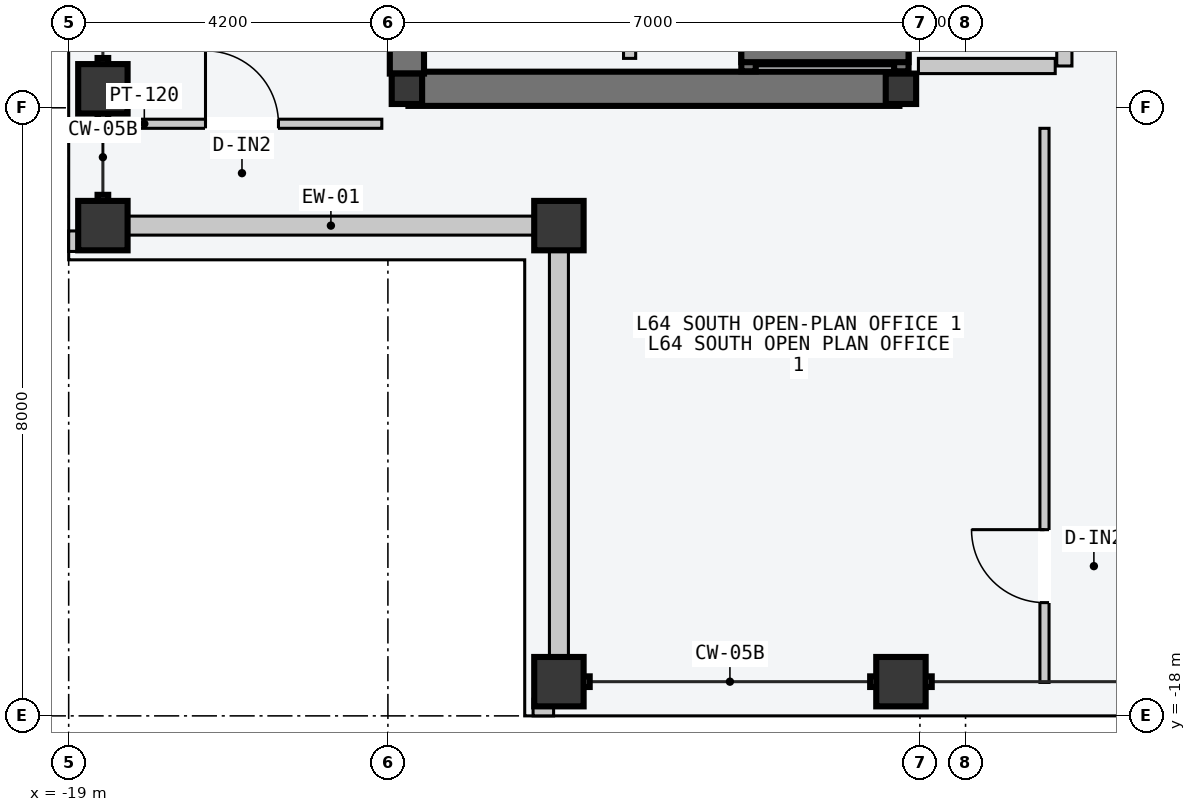
"""IFC4 building model, lengths in metres.
Left out: names, types, materials, properties, quantities, classifications, styles, units other than length and angle.
Written with IfcOpenShell. Run it as: python <this file> out.ifc"""

import sys

from ifc_helpers import new_model, si_unit, direction, frame, frame_2d, origin, origin_2d, place, context, subcontext, project, spatial, rectangle, hollow_rectangle, i_section, extrude, element, fill, save


model = new_model("IFC4")
c1 = context("Model", 3, precision=1e-05, world=origin(), true_north=direction((0.0, 1.0)))
c2 = subcontext(c1, "Body", "Model", "MODEL_VIEW")
j1 = project(units=[si_unit("LENGTHUNIT", "METRE"), si_unit("PLANEANGLEUNIT", "RADIAN")], contexts=[c1])
p1 = place(None, origin())
s1 = spatial("IfcSite", under=j1, at=p1, CompositionType="ELEMENT")
p2 = place(p1, origin())
s2 = spatial("IfcBuilding", under=s1, at=p2, CompositionType="ELEMENT")
p3 = place(p2, frame((0.0, 0.0, 243.6)))
s3 = spatial("IfcBuildingStorey", under=s2, at=p3, CompositionType="ELEMENT", Elevation=243.6)
p4 = place(p3, frame((-14.53, -9.75, -0.2), z_axis=(0.0, 0.0, 1.0), x_axis=(1.0, 0.0, 0.0)))
e1 = element("IfcWall", 1, at=p4, inside=s3, PredefinedType="SHEAR", context=c2, shape_type="SweptSolid", body=[
    extrude(rectangle(XDim=6.46, YDim=0.45, at=frame_2d((3.23, 0.0))), origin(), (0.0, 0.0, 1.0), 3.6),
])
p5 = place(p3, frame((-14.55, -9.55, -0.2), z_axis=(0.0, 0.0, 1.0), x_axis=(0.0, 1.0, 0.0)))
e2 = element("IfcWall", 2, at=p5, inside=s3, PredefinedType="SHEAR", context=c2, shape_type="SweptSolid", body=[
    extrude(rectangle(XDim=9.35, YDim=0.45, at=frame_2d((4.675, 0.0))), origin(), (0.0, 0.0, 1.0), 3.6),
])
for number, where, z_axis, x_axis in (
    (3, (-14.55, -9.75, 0.0), (0.0, 0.0, 1.0), (1.0, 0.0, 0.0)),
    (4, (-8.05, -9.75, 0.0), (0.0, 0.0, 1.0), (1.0, 0.0, 0.0)),
):
    element("IfcColumn", number, at=place(p3, frame(where, z_axis=z_axis, x_axis=x_axis)), inside=s3, PredefinedType="COLUMN", context=c2, shape_type="SweptSolid", body=[
        extrude(i_section(OverallWidth=0.4, OverallDepth=0.4, WebThickness=0.013, FlangeThickness=0.021, at=origin_2d()), origin(), (0.0, 0.0, 1.0), 3.6),
    ])
for number, where, z_axis, x_axis in (
    (5, (-12.55, -17.55, 0.0), (0.0, 0.0, 1.0), (1.0, 0.0, 0.0)),
    (6, (-8.05, -17.55, 0.0), (0.0, 0.0, 1.0), (1.0, 0.0, 0.0)),
    (7, (-18.55, -11.55, 0.0), (0.0, 0.0, 1.0), (0.0, 1.0, 0.0)),
    (8, (-18.55, -9.75, 0.0), (0.0, 0.0, 1.0), (0.0, 1.0, 0.0)),
    (9, (-12.55, -11.55, 0.0), (0.0, 0.0, 1.0), (1.0, 0.0, 0.0)),
):
    element("IfcColumn", number, at=place(p3, frame(where, z_axis=z_axis, x_axis=x_axis)), inside=s3, PredefinedType="COLUMN", context=c2, shape_type="SweptSolid", body=[
        extrude(hollow_rectangle(XDim=0.65, YDim=0.65, WallThickness=0.028, at=origin_2d()), origin(), (0.0, 0.0, 1.0), 3.6),
    ])
for number, where, z_axis, x_axis in (
    (10, (-18.215, -11.55, 0.0), (0.0, 0.0, 1.0), (1.0, 0.0, 0.0)),
    (11, (-12.55, -17.215, 0.0), (0.0, 0.0, 1.0), (0.0, 1.0, 0.0)),
):
    element("IfcWall", number, at=place(p3, frame(where, z_axis=z_axis, x_axis=x_axis)), inside=s3, PredefinedType="STANDARD", context=c2, shape_type="SweptSolid", body=[
        extrude(rectangle(XDim=5.33, YDim=0.25, at=frame_2d((2.665, 0.0))), origin(), (0.0, 0.0, 1.0), 1.74),
    ])
for number, where, z_axis, x_axis in (
    (12, (-12.89, -17.89, 0.0), (0.0, 0.0, 1.0), (1.0, 0.0, 0.0)),
    (13, (-18.89, -11.89, 0.0), (0.0, 0.0, 1.0), (0.0, 1.0, 0.0)),
):
    element("IfcWall", number, at=place(p3, frame(where, z_axis=z_axis, x_axis=x_axis)), inside=s3, PredefinedType="PARAPET", context=c2, shape_type="SweptSolid", body=[
        extrude(rectangle(XDim=0.27, YDim=0.22, at=frame_2d((0.135, 0.0))), origin(), (0.0, 0.0, 1.0), 1.2),
    ])
p6 = place(p3, frame((-8.045, -9.52, -0.2), z_axis=(0.0, 0.0, 1.0), x_axis=(0.0, 1.0, 0.0)))
e14 = element("IfcWall", 14, at=p6, inside=s3, PredefinedType="SOLIDWALL", context=c2, shape_type="SweptSolid", body=[
    extrude(rectangle(XDim=2.12, YDim=0.19, at=frame_2d((1.06, 0.0))), origin(), (0.0, 0.0, 1.0), 3.6),
])
p7 = place(p6, frame((0.57, 0.0, 0.2)))
e15 = element("IfcOpeningElement", 15, at=p7, cuts=e14, PredefinedType="OPENING", context=c2, shape_type="SweptSolid", body=[
    extrude(rectangle(XDim=1.1, YDim=2.2, at=frame_2d((0.55, 1.1))), frame((0.0, 0.105, 0.0), z_axis=(0.0, -1.0, 0.0), x_axis=(1.0, 0.0, 0.0)), (0.0, 0.0, 1.0), 0.21),
])
p8 = place(p3, frame((-10.055, -9.52, -0.2), z_axis=(0.0, 0.0, 1.0), x_axis=(0.0, 1.0, 0.0)))
e16 = element("IfcWall", 16, at=p8, inside=s3, PredefinedType="SOLIDWALL", context=c2, shape_type="SweptSolid", body=[
    extrude(rectangle(XDim=2.12, YDim=0.19, at=frame_2d((1.06, 0.0))), origin(), (0.0, 0.0, 1.0), 3.6),
])
p9 = place(p3, frame((-10.15, -9.305, -0.2), z_axis=(0.0, 0.0, 1.0), x_axis=(1.0, 0.0, 0.0)))
e17 = element("IfcWall", 17, at=p9, inside=s3, PredefinedType="SOLIDWALL", context=c2, shape_type="SweptSolid", body=[
    extrude(rectangle(XDim=2.2, YDim=0.19, at=frame_2d((1.1, 0.0))), origin(), (0.0, 0.0, 1.0), 3.6),
])
p10 = place(p3, frame((-5.9, -9.45, 0.0), z_axis=(0.0, 0.0, 1.0), x_axis=(0.0, 1.0, 0.0)))
e18 = element("IfcWall", 18, at=p10, inside=s3, PredefinedType="PARTITIONING", context=c2, shape_type="SweptSolid", body=[
    extrude(rectangle(XDim=10.5, YDim=0.2, at=frame_2d((5.25, 0.0))), origin(), (0.0, 0.0, 1.0), 3.4),
])
p11 = place(p10, frame((3.9, 0.0, 0.0)))
e19 = element("IfcOpeningElement", 19, at=p11, cuts=e18, PredefinedType="OPENING", context=c2, shape_type="SweptSolid", body=[
    extrude(rectangle(XDim=1.5, YDim=2.2, at=frame_2d((0.75, 1.1))), frame((0.0, 0.11, 0.0), z_axis=(0.0, -1.0, 0.0), x_axis=(1.0, 0.0, 0.0)), (0.0, 0.0, 1.0), 0.22),
])
p12 = place(p3, frame((-6.02, -9.45, 0.0), z_axis=(0.0, 0.0, 1.0), x_axis=(-1.0, 0.0, 0.0)))
e20 = element("IfcWall", 20, at=p12, inside=s3, PredefinedType="PARTITIONING", context=c2, shape_type="SweptSolid", body=[
    extrude(rectangle(XDim=1.8, YDim=0.2, at=frame_2d((0.9, 0.0))), origin(), (0.0, 0.0, 1.0), 3.4),
])
p13 = place(p3, frame((-11.62, -9.35, 0.0), z_axis=(0.0, 0.0, 1.0), x_axis=(0.0, 1.0, 0.0)))
e21 = element("IfcWall", 21, at=p13, inside=s3, PredefinedType="PARTITIONING", context=c2, shape_type="SweptSolid", body=[
    extrude(rectangle(XDim=3.85, YDim=0.16, at=frame_2d((1.925, 0.0))), origin(), (0.0, 0.0, 1.0), 3.4),
])
p14 = place(p13, frame((1.475, 0.0, 0.0)))
e22 = element("IfcOpeningElement", 22, at=p14, cuts=e21, PredefinedType="OPENING", context=c2, shape_type="SweptSolid", body=[
    extrude(rectangle(XDim=0.9, YDim=2.15, at=frame_2d((0.45, 1.075))), frame((0.0, 0.09, 0.0), z_axis=(0.0, -1.0, 0.0), x_axis=(1.0, 0.0, 0.0)), (0.0, 0.0, 1.0), 0.18),
])
p15 = place(p3, frame((-6.161, -17.56, 0.0), z_axis=(0.0, 0.0, 1.0), x_axis=(0.0, 1.0, 0.0)))
e23 = element("IfcWall", 23, at=p15, inside=s3, PredefinedType="PARTITIONING", context=c2, shape_type="SweptSolid", body=[
    extrude(rectangle(XDim=7.29, YDim=0.12, at=frame_2d((3.645, 0.0))), origin(), (0.0, 0.0, 1.0), 3.4),
])
p16 = place(p15, frame((1.05, 0.0, 0.0)))
e24 = element("IfcOpeningElement", 24, at=p16, cuts=e23, PredefinedType="OPENING", context=c2, shape_type="SweptSolid", body=[
    extrude(rectangle(XDim=0.96, YDim=2.18, at=frame_2d((0.48, 1.09))), frame((0.0, 0.07, 0.0), z_axis=(0.0, -1.0, 0.0), x_axis=(1.0, 0.0, 0.0)), (0.0, 0.0, 1.0), 0.14),
])
p17 = place(p3, frame((-18.56, -10.21, 0.0), z_axis=(0.0, 0.0, 1.0), x_axis=(1.0, 0.0, 0.0)))
e25 = element("IfcWall", 25, at=p17, inside=s3, PredefinedType="PARTITIONING", context=c2, shape_type="SweptSolid", body=[
    extrude(rectangle(XDim=3.68, YDim=0.12, at=frame_2d((1.84, 0.0))), origin(), (0.0, 0.0, 1.0), 3.4),
])
p18 = place(p17, frame((1.36, 0.0, 0.0)))
e26 = element("IfcOpeningElement", 26, at=p18, cuts=e25, PredefinedType="OPENING", context=c2, shape_type="SweptSolid", body=[
    extrude(rectangle(XDim=0.96, YDim=2.18, at=frame_2d((0.48, 1.09))), frame((0.0, 0.07, 0.0), z_axis=(0.0, -1.0, 0.0), x_axis=(1.0, 0.0, 0.0)), (0.0, 0.0, 1.0), 0.14),
])
p19 = place(p16, origin())
e27 = element("IfcDoor", 27, at=p19, inside=s3, OperationType="SINGLE_SWING_RIGHT", PredefinedType="DOOR", context=c2, shape_type="SweptSolid", body=[
    extrude(rectangle(XDim=0.96, YDim=2.18, at=frame_2d((0.48, 1.09))), frame((0.0, 0.025, 0.0), z_axis=(0.0, -1.0, 0.0), x_axis=(1.0, 0.0, 0.0)), (0.0, 0.0, 1.0), 0.05),
])
fill(e24, e27)
p20 = place(p18, origin())
e28 = element("IfcDoor", 28, at=p20, inside=s3, OperationType="SINGLE_SWING_LEFT", PredefinedType="DOOR", context=c2, shape_type="SweptSolid", body=[
    extrude(rectangle(XDim=0.96, YDim=2.18, at=frame_2d((0.48, 1.09))), frame((0.0, 0.025, 0.0), z_axis=(0.0, -1.0, 0.0), x_axis=(1.0, 0.0, 0.0)), (0.0, 0.0, 1.0), 0.05),
])
fill(e26, e28)
save(model, sys.argv[1])
